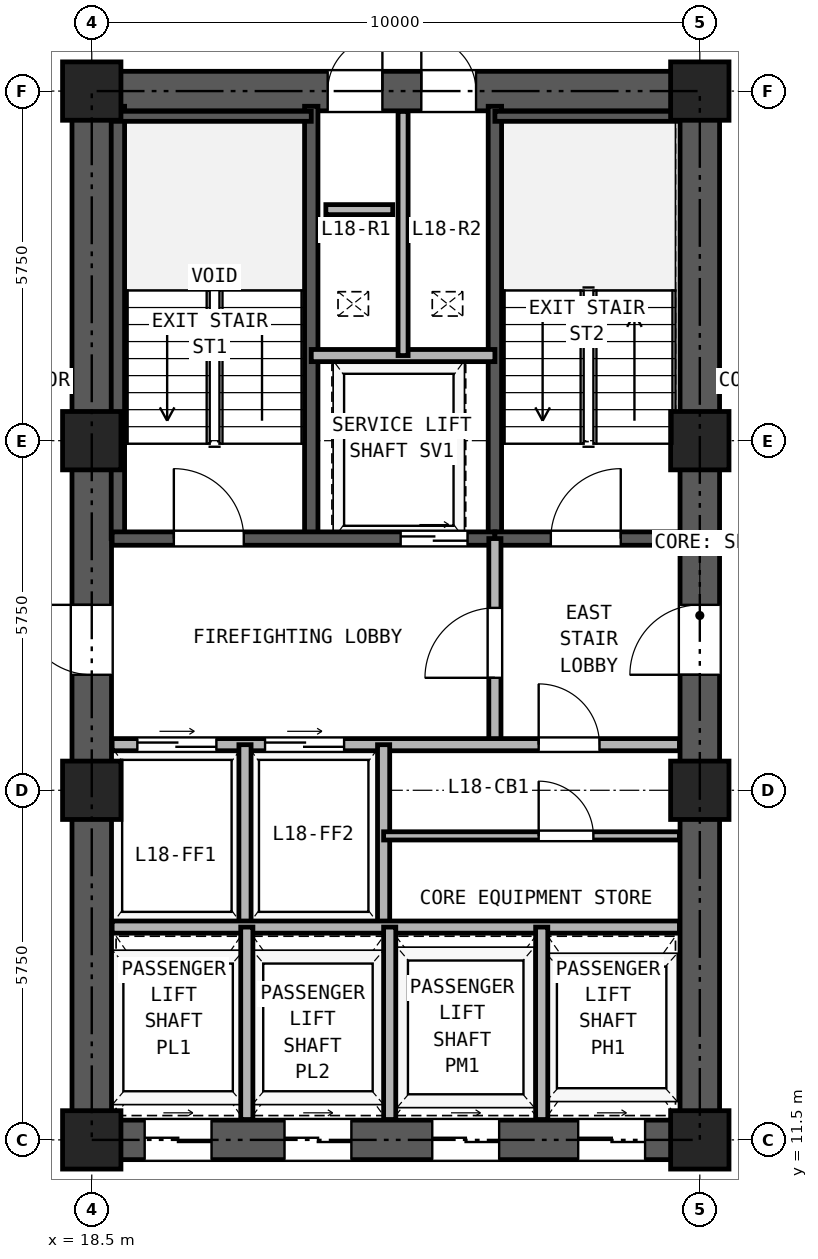
"""IFC4 building model, lengths in metres.
Left out: names, types, materials, properties, quantities, classifications, styles, units other than length and angle.
Written with IfcOpenShell. Run it as: python <this file> out.ifc"""

import sys

from ifc_helpers import new_model, si_unit, direction, frame, frame_2d, origin, origin_2d, place, context, subcontext, project, spatial, rectangle, hollow_rectangle, extrude, source, transform, mapped, element, fill, save


model = new_model("IFC4")
c1 = context("Model", 3, precision=1e-05, world=origin(), true_north=direction((0.0, 1.0)))
c2 = subcontext(c1, "Body", "Model", "MODEL_VIEW")
j1 = project(units=[si_unit("LENGTHUNIT", "METRE"), si_unit("PLANEANGLEUNIT", "RADIAN")], contexts=[c1])
p1 = place(None, origin())
s1 = spatial("IfcSite", under=j1, at=p1, CompositionType="ELEMENT")
p2 = place(p1, origin())
s2 = spatial("IfcBuilding", under=s1, at=p2, CompositionType="ELEMENT")
p3 = place(p2, frame((0.0, 0.0, 69.3)))
s3 = spatial("IfcBuildingStorey", under=s2, at=p3, CompositionType="ELEMENT", Elevation=69.3)
m1 = source(origin(), c2, "Body", "SweptSolid", [
    extrude(hollow_rectangle(XDim=0.96, YDim=0.96, WallThickness=0.06, at=origin_2d()), origin(), (0.0, 0.0, 1.0), 3.32),
])
for number, where, z_axis, x_axis in (
    (1, (18.5, 11.5, 0.0), (0.0, 0.0, 1.0), (1.0, 0.0, 0.0)),
    (2, (18.5, 17.25, 0.0), (0.0, 0.0, 1.0), (1.0, 0.0, 0.0)),
    (3, (18.5, 23.0, 0.0), (0.0, 0.0, 1.0), (1.0, 0.0, 0.0)),
    (4, (18.5, 28.75, 0.0), (0.0, 0.0, 1.0), (1.0, 0.0, 0.0)),
    (5, (28.5, 11.5, 0.0), (0.0, 0.0, 1.0), (1.0, 0.0, 0.0)),
    (6, (28.5, 17.25, 0.0), (0.0, 0.0, 1.0), (1.0, 0.0, 0.0)),
    (7, (28.5, 23.0, 0.0), (0.0, 0.0, 1.0), (1.0, 0.0, 0.0)),
    (8, (28.5, 28.75, 0.0), (0.0, 0.0, 1.0), (1.0, 0.0, 0.0)),
):
    element("IfcColumn", number, at=place(p3, frame(where, z_axis=z_axis, x_axis=x_axis)), inside=s3, PredefinedType="COLUMN", context=c2, shape_type="MappedRepresentation", body=[
        mapped(m1, transform((0.0, 0.0, 0.0), x_axis=(1.0, 0.0, 0.0), y_axis=(0.0, 1.0, 0.0), z_axis=(0.0, 0.0, 1.0), scale=1.0)),
    ])
p4 = place(p3, frame((18.175, 11.5, 0.0), z_axis=(0.0, 0.0, 1.0), x_axis=(1.0, 0.0, 0.0)))
e9 = element("IfcWall", 9, at=p4, inside=s3, PredefinedType="SHEAR", context=c2, shape_type="SweptSolid", body=[
    extrude(rectangle(XDim=10.65, YDim=0.65, at=frame_2d((5.325, 0.0))), origin(), (0.0, 0.0, 1.0), 3.32),
])
p5 = place(p4, frame((1.195, 0.0, 0.0)))
e10 = element("IfcOpeningElement", 10, at=p5, cuts=e9, PredefinedType="OPENING", context=c2, shape_type="SweptSolid", body=[
    extrude(rectangle(XDim=1.1, YDim=2.25, at=frame_2d((0.55, 1.125))), frame((0.0, 0.335, 0.0), z_axis=(0.0, -1.0, 0.0), x_axis=(1.0, 0.0, 0.0)), (0.0, 0.0, 1.0), 0.67),
])
p6 = place(p4, frame((3.495, 0.0, 0.0)))
e11 = element("IfcOpeningElement", 11, at=p6, cuts=e9, PredefinedType="OPENING", context=c2, shape_type="SweptSolid", body=[
    extrude(rectangle(XDim=1.1, YDim=2.25, at=frame_2d((0.55, 1.125))), frame((0.0, 0.335, 0.0), z_axis=(0.0, -1.0, 0.0), x_axis=(1.0, 0.0, 0.0)), (0.0, 0.0, 1.0), 0.67),
])
p7 = place(p4, frame((5.925, 0.0, 0.0)))
e12 = element("IfcOpeningElement", 12, at=p7, cuts=e9, PredefinedType="OPENING", context=c2, shape_type="SweptSolid", body=[
    extrude(rectangle(XDim=1.1, YDim=2.25, at=frame_2d((0.55, 1.125))), frame((0.0, 0.335, 0.0), z_axis=(0.0, -1.0, 0.0), x_axis=(1.0, 0.0, 0.0)), (0.0, 0.0, 1.0), 0.67),
])
p8 = place(p4, frame((8.325, 0.0, 0.0)))
e13 = element("IfcOpeningElement", 13, at=p8, cuts=e9, PredefinedType="OPENING", context=c2, shape_type="SweptSolid", body=[
    extrude(rectangle(XDim=1.1, YDim=2.25, at=frame_2d((0.55, 1.125))), frame((0.0, 0.335, 0.0), z_axis=(0.0, -1.0, 0.0), x_axis=(1.0, 0.0, 0.0)), (0.0, 0.0, 1.0), 0.67),
])
p9 = place(p3, frame((18.175, 28.75, 0.0), z_axis=(0.0, 0.0, 1.0), x_axis=(1.0, 0.0, 0.0)))
e14 = element("IfcWall", 14, at=p9, inside=s3, PredefinedType="SHEAR", context=c2, shape_type="SweptSolid", body=[
    extrude(rectangle(XDim=10.65, YDim=0.65, at=frame_2d((5.325, 0.0))), origin(), (0.0, 0.0, 1.0), 3.32),
])
p10 = place(p9, frame((4.205, 0.0, 0.0)))
e15 = element("IfcOpeningElement", 15, at=p10, cuts=e14, PredefinedType="OPENING", context=c2, shape_type="SweptSolid", body=[
    extrude(rectangle(XDim=0.9, YDim=2.05, at=frame_2d((0.45, 1.025))), frame((0.0, 0.335, 0.0), z_axis=(0.0, -1.0, 0.0), x_axis=(1.0, 0.0, 0.0)), (0.0, 0.0, 1.0), 0.67),
])
p11 = place(p9, frame((5.745, 0.0, 0.0)))
e16 = element("IfcOpeningElement", 16, at=p11, cuts=e14, PredefinedType="OPENING", context=c2, shape_type="SweptSolid", body=[
    extrude(rectangle(XDim=0.9, YDim=2.05, at=frame_2d((0.45, 1.025))), frame((0.0, 0.335, 0.0), z_axis=(0.0, -1.0, 0.0), x_axis=(1.0, 0.0, 0.0)), (0.0, 0.0, 1.0), 0.67),
])
p12 = place(p3, frame((18.5, 11.825, 0.0), z_axis=(0.0, 0.0, 1.0), x_axis=(0.0, 1.0, 0.0)))
e17 = element("IfcWall", 17, at=p12, inside=s3, PredefinedType="SHEAR", context=c2, shape_type="SweptSolid", body=[
    extrude(rectangle(XDim=16.6, YDim=0.65, at=frame_2d((8.3, 0.0))), origin(), (0.0, 0.0, 1.0), 3.32),
])
p13 = place(p12, frame((7.325, 0.0, 0.0)))
e18 = element("IfcOpeningElement", 18, at=p13, cuts=e17, PredefinedType="OPENING", context=c2, shape_type="SweptSolid", body=[
    extrude(rectangle(XDim=1.15, YDim=2.2, at=frame_2d((0.575, 1.1))), frame((0.0, 0.335, 0.0), z_axis=(0.0, -1.0, 0.0), x_axis=(1.0, 0.0, 0.0)), (0.0, 0.0, 1.0), 0.67),
])
p14 = place(p3, frame((28.5, 11.825, 0.0), z_axis=(0.0, 0.0, 1.0), x_axis=(0.0, 1.0, 0.0)))
e19 = element("IfcWall", 19, at=p14, inside=s3, PredefinedType="SHEAR", context=c2, shape_type="SweptSolid", body=[
    extrude(rectangle(XDim=16.6, YDim=0.65, at=frame_2d((8.3, 0.0))), origin(), (0.0, 0.0, 1.0), 3.32),
])
p15 = place(p14, frame((7.325, 0.0, 0.0)))
e20 = element("IfcOpeningElement", 20, at=p15, cuts=e19, PredefinedType="OPENING", context=c2, shape_type="SweptSolid", body=[
    extrude(rectangle(XDim=1.15, YDim=2.2, at=frame_2d((0.575, 1.1))), frame((0.0, 0.335, 0.0), z_axis=(0.0, -1.0, 0.0), x_axis=(1.0, 0.0, 0.0)), (0.0, 0.0, 1.0), 0.67),
])
for number, where, z_axis, x_axis in (
    (21, (18.93, 21.39, 0.0), (0.0, 0.0, 1.0), (0.0, 1.0, 0.0)),
    (22, (22.11, 21.39, 0.0), (0.0, 0.0, 1.0), (0.0, 1.0, 0.0)),
    (23, (25.13, 21.39, 0.0), (0.0, 0.0, 1.0), (0.0, 1.0, 0.0)),
):
    element("IfcWall", number, at=place(p3, frame(where, z_axis=z_axis, x_axis=x_axis)), inside=s3, PredefinedType="SOLIDWALL", context=c2, shape_type="SweptSolid", body=[
        extrude(rectangle(XDim=7.11, YDim=0.22, at=frame_2d((3.555, 0.0))), origin(), (0.0, 0.0, 1.0), 3.32),
    ])
p16 = place(p3, frame((18.835, 28.335, 0.0), z_axis=(0.0, 0.0, 1.0), x_axis=(1.0, 0.0, 0.0)))
e24 = element("IfcWall", 24, at=p16, inside=s3, PredefinedType="PARTITIONING", context=c2, shape_type="SweptSolid", body=[
    extrude(rectangle(XDim=3.275, YDim=0.165, at=frame_2d((1.638, 0.0))), origin(), (0.0, 0.0, 1.0), 3.32),
])
p17 = place(p3, frame((25.13, 28.335, 0.0), z_axis=(0.0, 0.0, 1.0), x_axis=(1.0, 0.0, 0.0)))
e25 = element("IfcWall", 25, at=p17, inside=s3, PredefinedType="PARTITIONING", context=c2, shape_type="SweptSolid", body=[
    extrude(rectangle(XDim=3.035, YDim=0.165, at=frame_2d((1.518, 0.0))), origin(), (0.0, 0.0, 1.0), 3.32),
])
p18 = place(p3, frame((18.835, 21.39, 0.0), z_axis=(0.0, 0.0, 1.0), x_axis=(1.0, 0.0, 0.0)))
e26 = element("IfcWall", 26, at=p18, inside=s3, PredefinedType="SOLIDWALL", context=c2, shape_type="SweptSolid", body=[
    extrude(rectangle(XDim=6.295, YDim=0.22, at=frame_2d((3.147, 0.0))), origin(), (0.0, 0.0, 1.0), 3.32),
])
p19 = place(p18, frame((1.015, 0.0, 0.0)))
e27 = element("IfcOpeningElement", 27, at=p19, cuts=e26, PredefinedType="OPENING", context=c2, shape_type="SweptSolid", body=[
    extrude(rectangle(XDim=1.15, YDim=2.2, at=frame_2d((0.575, 1.1))), frame((0.0, 0.12, 0.0), z_axis=(0.0, -1.0, 0.0), x_axis=(1.0, 0.0, 0.0)), (0.0, 0.0, 1.0), 0.24),
])
p20 = place(p18, frame((4.745, 0.0, 0.0)))
e28 = element("IfcOpeningElement", 28, at=p20, cuts=e26, PredefinedType="OPENING", context=c2, shape_type="SweptSolid", body=[
    extrude(rectangle(XDim=1.1, YDim=2.25, at=frame_2d((0.55, 1.125))), frame((0.0, 0.12, 0.0), z_axis=(0.0, -1.0, 0.0), x_axis=(1.0, 0.0, 0.0)), (0.0, 0.0, 1.0), 0.24),
])
p21 = place(p3, frame((25.13, 21.39, 0.0), z_axis=(0.0, 0.0, 1.0), x_axis=(1.0, 0.0, 0.0)))
e29 = element("IfcWall", 29, at=p21, inside=s3, PredefinedType="SOLIDWALL", context=c2, shape_type="SweptSolid", body=[
    extrude(rectangle(XDim=3.035, YDim=0.22, at=frame_2d((1.518, 0.0))), origin(), (0.0, 0.0, 1.0), 3.32),
])
p22 = place(p21, frame((0.92, 0.0, 0.0)))
e30 = element("IfcOpeningElement", 30, at=p22, cuts=e29, PredefinedType="OPENING", context=c2, shape_type="SweptSolid", body=[
    extrude(rectangle(XDim=1.15, YDim=2.2, at=frame_2d((0.575, 1.1))), frame((0.0, 0.12, 0.0), z_axis=(0.0, -1.0, 0.0), x_axis=(1.0, 0.0, 0.0)), (0.0, 0.0, 1.0), 0.24),
])
p23 = place(p3, frame((22.11, 24.4, 0.0), z_axis=(0.0, 0.0, 1.0), x_axis=(1.0, 0.0, 0.0)))
e31 = element("IfcWall", 31, at=p23, inside=s3, PredefinedType="PARTITIONING", context=c2, shape_type="SweptSolid", body=[
    extrude(rectangle(XDim=3.02, YDim=0.2, at=frame_2d((1.51, 0.0))), origin(), (0.0, 0.0, 1.0), 3.32),
])
p24 = place(p3, frame((23.62, 24.4, 0.0), z_axis=(0.0, 0.0, 1.0), x_axis=(0.0, 1.0, 0.0)))
e32 = element("IfcWall", 32, at=p24, inside=s3, PredefinedType="PARTITIONING", context=c2, shape_type="SweptSolid", body=[
    extrude(rectangle(XDim=4.015, YDim=0.165, at=frame_2d((2.008, 0.0))), origin(), (0.0, 0.0, 1.0), 3.32),
])
p25 = place(p3, frame((25.13, 18.0, 0.0), z_axis=(0.0, 0.0, 1.0), x_axis=(0.0, 1.0, 0.0)))
e33 = element("IfcWall", 33, at=p25, inside=s3, PredefinedType="PARTITIONING", context=c2, shape_type="SweptSolid", body=[
    extrude(rectangle(XDim=3.39, YDim=0.2, at=frame_2d((1.695, 0.0))), origin(), (0.0, 0.0, 1.0), 3.32),
])
p26 = place(p25, frame((1.1, 0.0, 0.0)))
e34 = element("IfcOpeningElement", 34, at=p26, cuts=e33, PredefinedType="OPENING", context=c2, shape_type="SweptSolid", body=[
    extrude(rectangle(XDim=1.15, YDim=2.2, at=frame_2d((0.575, 1.1))), frame((0.0, 0.11, 0.0), z_axis=(0.0, -1.0, 0.0), x_axis=(1.0, 0.0, 0.0)), (0.0, 0.0, 1.0), 0.22),
])
p27 = place(p3, frame((18.835, 18.0, 0.0), z_axis=(0.0, 0.0, 1.0), x_axis=(1.0, 0.0, 0.0)))
e35 = element("IfcWall", 35, at=p27, inside=s3, PredefinedType="PARTITIONING", context=c2, shape_type="SweptSolid", body=[
    extrude(rectangle(XDim=9.33, YDim=0.2, at=frame_2d((4.665, 0.0))), origin(), (0.0, 0.0, 1.0), 3.32),
])
p28 = place(p27, frame((0.415, 0.0, 0.0)))
e36 = element("IfcOpeningElement", 36, at=p28, cuts=e35, PredefinedType="OPENING", context=c2, shape_type="SweptSolid", body=[
    extrude(rectangle(XDim=1.3, YDim=2.3, at=frame_2d((0.65, 1.15))), frame((0.0, 0.11, 0.0), z_axis=(0.0, -1.0, 0.0), x_axis=(1.0, 0.0, 0.0)), (0.0, 0.0, 1.0), 0.22),
])
p29 = place(p27, frame((2.515, 0.0, 0.0)))
e37 = element("IfcOpeningElement", 37, at=p29, cuts=e35, PredefinedType="OPENING", context=c2, shape_type="SweptSolid", body=[
    extrude(rectangle(XDim=1.3, YDim=2.3, at=frame_2d((0.65, 1.15))), frame((0.0, 0.11, 0.0), z_axis=(0.0, -1.0, 0.0), x_axis=(1.0, 0.0, 0.0)), (0.0, 0.0, 1.0), 0.22),
])
p30 = place(p27, frame((7.015, 0.0, 0.0)))
e38 = element("IfcOpeningElement", 38, at=p30, cuts=e35, PredefinedType="OPENING", context=c2, shape_type="SweptSolid", body=[
    extrude(rectangle(XDim=1.0, YDim=2.15, at=frame_2d((0.5, 1.075))), frame((0.0, 0.11, 0.0), z_axis=(0.0, -1.0, 0.0), x_axis=(1.0, 0.0, 0.0)), (0.0, 0.0, 1.0), 0.22),
])
for number, where, z_axis, x_axis in (
    (39, (21.02, 15.0, 0.0), (0.0, 0.0, 1.0), (0.0, 1.0, 0.0)),
    (40, (23.3, 15.0, 0.0), (0.0, 0.0, 1.0), (0.0, 1.0, 0.0)),
):
    element("IfcWall", number, at=place(p3, frame(where, z_axis=z_axis, x_axis=x_axis)), inside=s3, PredefinedType="PARTITIONING", context=c2, shape_type="SweptSolid", body=[
        extrude(rectangle(XDim=3.0, YDim=0.2, at=frame_2d((1.5, 0.0))), origin(), (0.0, 0.0, 1.0), 3.32),
    ])
p31 = place(p3, frame((18.835, 15.0, 0.0), z_axis=(0.0, 0.0, 1.0), x_axis=(1.0, 0.0, 0.0)))
e41 = element("IfcWall", 41, at=p31, inside=s3, PredefinedType="PARTITIONING", context=c2, shape_type="SweptSolid", body=[
    extrude(rectangle(XDim=9.33, YDim=0.2, at=frame_2d((4.665, 0.0))), origin(), (0.0, 0.0, 1.0), 3.32),
])
p32 = place(p3, frame((23.3, 16.5, 0.0), z_axis=(0.0, 0.0, 1.0), x_axis=(1.0, 0.0, 0.0)))
e42 = element("IfcWall", 42, at=p32, inside=s3, PredefinedType="PARTITIONING", context=c2, shape_type="SweptSolid", body=[
    extrude(rectangle(XDim=4.865, YDim=0.135, at=frame_2d((2.433, 0.0))), origin(), (0.0, 0.0, 1.0), 3.32),
])
p33 = place(p32, frame((2.55, 0.0, 0.0)))
e43 = element("IfcOpeningElement", 43, at=p33, cuts=e42, PredefinedType="OPENING", context=c2, shape_type="SweptSolid", body=[
    extrude(rectangle(XDim=0.9, YDim=2.05, at=frame_2d((0.45, 1.025))), frame((0.0, 0.077, 0.0), z_axis=(0.0, -1.0, 0.0), x_axis=(1.0, 0.0, 0.0)), (0.0, 0.0, 1.0), 0.155),
])
for number, where, z_axis, x_axis in (
    (44, (21.05, 11.835, 0.0), (0.0, 0.0, 1.0), (0.0, 1.0, 0.0)),
    (45, (23.4, 11.835, 0.0), (0.0, 0.0, 1.0), (0.0, 1.0, 0.0)),
    (46, (25.9, 11.835, 0.0), (0.0, 0.0, 1.0), (0.0, 1.0, 0.0)),
):
    element("IfcWall", number, at=place(p3, frame(where, z_axis=z_axis, x_axis=x_axis)), inside=s3, PredefinedType="PARTITIONING", context=c2, shape_type="SweptSolid", body=[
        extrude(rectangle(XDim=3.165, YDim=0.2, at=frame_2d((1.583, 0.0))), origin(), (0.0, 0.0, 1.0), 3.32),
    ])
p34 = place(p3, frame((22.35, 26.8, 0.0), z_axis=(0.0, 0.0, 1.0), x_axis=(1.0, 0.0, 0.0)))
e47 = element("IfcWall", 47, at=p34, inside=s3, PredefinedType="PARTITIONING", context=c2, shape_type="SweptSolid", body=[
    extrude(rectangle(XDim=1.1, YDim=0.165, at=frame_2d((0.55, 0.0))), origin(), (0.0, 0.0, 1.0), 3.32),
])
p35 = place(p19, frame((1.15, 0.0, 0.0), z_axis=(0.0, 0.0, 1.0), x_axis=(-1.0, 0.0, 0.0)))
e48 = element("IfcDoor", 48, at=p35, inside=s3, OperationType="SINGLE_SWING_LEFT", PredefinedType="DOOR", context=c2, shape_type="SweptSolid", body=[
    extrude(rectangle(XDim=1.15, YDim=2.2, at=frame_2d((0.575, 1.1))), frame((0.0, 0.025, 0.0), z_axis=(0.0, -1.0, 0.0), x_axis=(1.0, 0.0, 0.0)), (0.0, 0.0, 1.0), 0.05),
])
fill(e27, e48)
p36 = place(p22, frame((1.15, 0.0, 0.0), z_axis=(0.0, 0.0, 1.0), x_axis=(-1.0, 0.0, 0.0)))
e49 = element("IfcDoor", 49, at=p36, inside=s3, OperationType="SINGLE_SWING_RIGHT", PredefinedType="DOOR", context=c2, shape_type="SweptSolid", body=[
    extrude(rectangle(XDim=1.15, YDim=2.2, at=frame_2d((0.575, 1.1))), frame((0.0, 0.025, 0.0), z_axis=(0.0, -1.0, 0.0), x_axis=(1.0, 0.0, 0.0)), (0.0, 0.0, 1.0), 0.05),
])
fill(e30, e49)
p37 = place(p20, frame((1.1, 0.0, 0.0), z_axis=(0.0, 0.0, 1.0), x_axis=(-1.0, 0.0, 0.0)))
e50 = element("IfcDoor", 50, at=p37, inside=s3, OperationType="DOUBLE_DOOR_SLIDING", PredefinedType="DOOR", context=c2, shape_type="SweptSolid", body=[
    extrude(rectangle(XDim=1.1, YDim=2.25, at=frame_2d((0.55, 1.125))), frame((0.0, 0.025, 0.0), z_axis=(0.0, -1.0, 0.0), x_axis=(1.0, 0.0, 0.0)), (0.0, 0.0, 1.0), 0.05),
])
fill(e28, e50)
p38 = place(p26, origin())
e51 = element("IfcDoor", 51, at=p38, inside=s3, OperationType="SINGLE_SWING_LEFT", PredefinedType="DOOR", context=c2, shape_type="SweptSolid", body=[
    extrude(rectangle(XDim=1.15, YDim=2.2, at=frame_2d((0.575, 1.1))), frame((0.0, 0.025, 0.0), z_axis=(0.0, -1.0, 0.0), x_axis=(1.0, 0.0, 0.0)), (0.0, 0.0, 1.0), 0.05),
])
fill(e34, e51)
p39 = place(p28, origin())
e52 = element("IfcDoor", 52, at=p39, inside=s3, OperationType="DOUBLE_DOOR_SLIDING", PredefinedType="DOOR", context=c2, shape_type="SweptSolid", body=[
    extrude(rectangle(XDim=1.3, YDim=2.3, at=frame_2d((0.65, 1.15))), frame((0.0, 0.025, 0.0), z_axis=(0.0, -1.0, 0.0), x_axis=(1.0, 0.0, 0.0)), (0.0, 0.0, 1.0), 0.05),
])
fill(e36, e52)
p40 = place(p29, origin())
e53 = element("IfcDoor", 53, at=p40, inside=s3, OperationType="DOUBLE_DOOR_SLIDING", PredefinedType="DOOR", context=c2, shape_type="SweptSolid", body=[
    extrude(rectangle(XDim=1.3, YDim=2.3, at=frame_2d((0.65, 1.15))), frame((0.0, 0.025, 0.0), z_axis=(0.0, -1.0, 0.0), x_axis=(1.0, 0.0, 0.0)), (0.0, 0.0, 1.0), 0.05),
])
fill(e37, e53)
p41 = place(p30, frame((1.0, 0.0, 0.0), z_axis=(0.0, 0.0, 1.0), x_axis=(-1.0, 0.0, 0.0)))
e54 = element("IfcDoor", 54, at=p41, inside=s3, OperationType="SINGLE_SWING_LEFT", PredefinedType="DOOR", context=c2, shape_type="SweptSolid", body=[
    extrude(rectangle(XDim=1.0, YDim=2.15, at=frame_2d((0.5, 1.075))), frame((0.0, 0.025, 0.0), z_axis=(0.0, -1.0, 0.0), x_axis=(1.0, 0.0, 0.0)), (0.0, 0.0, 1.0), 0.05),
])
fill(e38, e54)
p42 = place(p33, frame((0.9, 0.0, 0.0), z_axis=(0.0, 0.0, 1.0), x_axis=(-1.0, 0.0, 0.0)))
e55 = element("IfcDoor", 55, at=p42, inside=s3, OperationType="SINGLE_SWING_LEFT", PredefinedType="DOOR", context=c2, shape_type="SweptSolid", body=[
    extrude(rectangle(XDim=0.9, YDim=2.05, at=frame_2d((0.45, 1.025))), frame((0.0, 0.025, 0.0), z_axis=(0.0, -1.0, 0.0), x_axis=(1.0, 0.0, 0.0)), (0.0, 0.0, 1.0), 0.05),
])
fill(e43, e55)
p43 = place(p13, frame((1.15, 0.0, 0.0), z_axis=(0.0, 0.0, 1.0), x_axis=(-1.0, 0.0, 0.0)))
e56 = element("IfcDoor", 56, at=p43, inside=s3, OperationType="SINGLE_SWING_RIGHT", PredefinedType="DOOR", context=c2, shape_type="SweptSolid", body=[
    extrude(rectangle(XDim=1.15, YDim=2.2, at=frame_2d((0.575, 1.1))), frame((0.0, 0.025, 0.0), z_axis=(0.0, -1.0, 0.0), x_axis=(1.0, 0.0, 0.0)), (0.0, 0.0, 1.0), 0.05),
])
fill(e18, e56)
p44 = place(p15, origin())
e57 = element("IfcDoor", 57, at=p44, inside=s3, OperationType="SINGLE_SWING_LEFT", PredefinedType="DOOR", context=c2, shape_type="SweptSolid", body=[
    extrude(rectangle(XDim=1.15, YDim=2.2, at=frame_2d((0.575, 1.1))), frame((0.0, 0.025, 0.0), z_axis=(0.0, -1.0, 0.0), x_axis=(1.0, 0.0, 0.0)), (0.0, 0.0, 1.0), 0.05),
])
fill(e20, e57)
p45 = place(p10, origin())
e58 = element("IfcDoor", 58, at=p45, inside=s3, OperationType="SINGLE_SWING_RIGHT", PredefinedType="DOOR", context=c2, shape_type="SweptSolid", body=[
    extrude(rectangle(XDim=0.9, YDim=2.05, at=frame_2d((0.45, 1.025))), frame((0.0, 0.025, 0.0), z_axis=(0.0, -1.0, 0.0), x_axis=(1.0, 0.0, 0.0)), (0.0, 0.0, 1.0), 0.05),
])
fill(e15, e58)
p46 = place(p11, origin())
e59 = element("IfcDoor", 59, at=p46, inside=s3, OperationType="SINGLE_SWING_LEFT", PredefinedType="DOOR", context=c2, shape_type="SweptSolid", body=[
    extrude(rectangle(XDim=0.9, YDim=2.05, at=frame_2d((0.45, 1.025))), frame((0.0, 0.025, 0.0), z_axis=(0.0, -1.0, 0.0), x_axis=(1.0, 0.0, 0.0)), (0.0, 0.0, 1.0), 0.05),
])
fill(e16, e59)
p47 = place(p5, frame((1.1, 0.0, 0.0), z_axis=(0.0, 0.0, 1.0), x_axis=(-1.0, 0.0, 0.0)))
e60 = element("IfcDoor", 60, at=p47, inside=s3, OperationType="DOUBLE_DOOR_SLIDING", PredefinedType="DOOR", context=c2, shape_type="SweptSolid", body=[
    extrude(rectangle(XDim=1.1, YDim=2.25, at=frame_2d((0.55, 1.125))), frame((0.0, 0.025, 0.0), z_axis=(0.0, -1.0, 0.0), x_axis=(1.0, 0.0, 0.0)), (0.0, 0.0, 1.0), 0.05),
])
fill(e10, e60)
p48 = place(p6, frame((1.1, 0.0, 0.0), z_axis=(0.0, 0.0, 1.0), x_axis=(-1.0, 0.0, 0.0)))
e61 = element("IfcDoor", 61, at=p48, inside=s3, OperationType="DOUBLE_DOOR_SLIDING", PredefinedType="DOOR", context=c2, shape_type="SweptSolid", body=[
    extrude(rectangle(XDim=1.1, YDim=2.25, at=frame_2d((0.55, 1.125))), frame((0.0, 0.025, 0.0), z_axis=(0.0, -1.0, 0.0), x_axis=(1.0, 0.0, 0.0)), (0.0, 0.0, 1.0), 0.05),
])
fill(e11, e61)
p49 = place(p7, frame((1.1, 0.0, 0.0), z_axis=(0.0, 0.0, 1.0), x_axis=(-1.0, 0.0, 0.0)))
e62 = element("IfcDoor", 62, at=p49, inside=s3, OperationType="DOUBLE_DOOR_SLIDING", PredefinedType="DOOR", context=c2, shape_type="SweptSolid", body=[
    extrude(rectangle(XDim=1.1, YDim=2.25, at=frame_2d((0.55, 1.125))), frame((0.0, 0.025, 0.0), z_axis=(0.0, -1.0, 0.0), x_axis=(1.0, 0.0, 0.0)), (0.0, 0.0, 1.0), 0.05),
])
fill(e12, e62)
p50 = place(p8, frame((1.1, 0.0, 0.0), z_axis=(0.0, 0.0, 1.0), x_axis=(-1.0, 0.0, 0.0)))
e63 = element("IfcDoor", 63, at=p50, inside=s3, OperationType="DOUBLE_DOOR_SLIDING", PredefinedType="DOOR", context=c2, shape_type="SweptSolid", body=[
    extrude(rectangle(XDim=1.1, YDim=2.25, at=frame_2d((0.55, 1.125))), frame((0.0, 0.025, 0.0), z_axis=(0.0, -1.0, 0.0), x_axis=(1.0, 0.0, 0.0)), (0.0, 0.0, 1.0), 0.05),
])
fill(e13, e63)
save(model, sys.argv[1])
